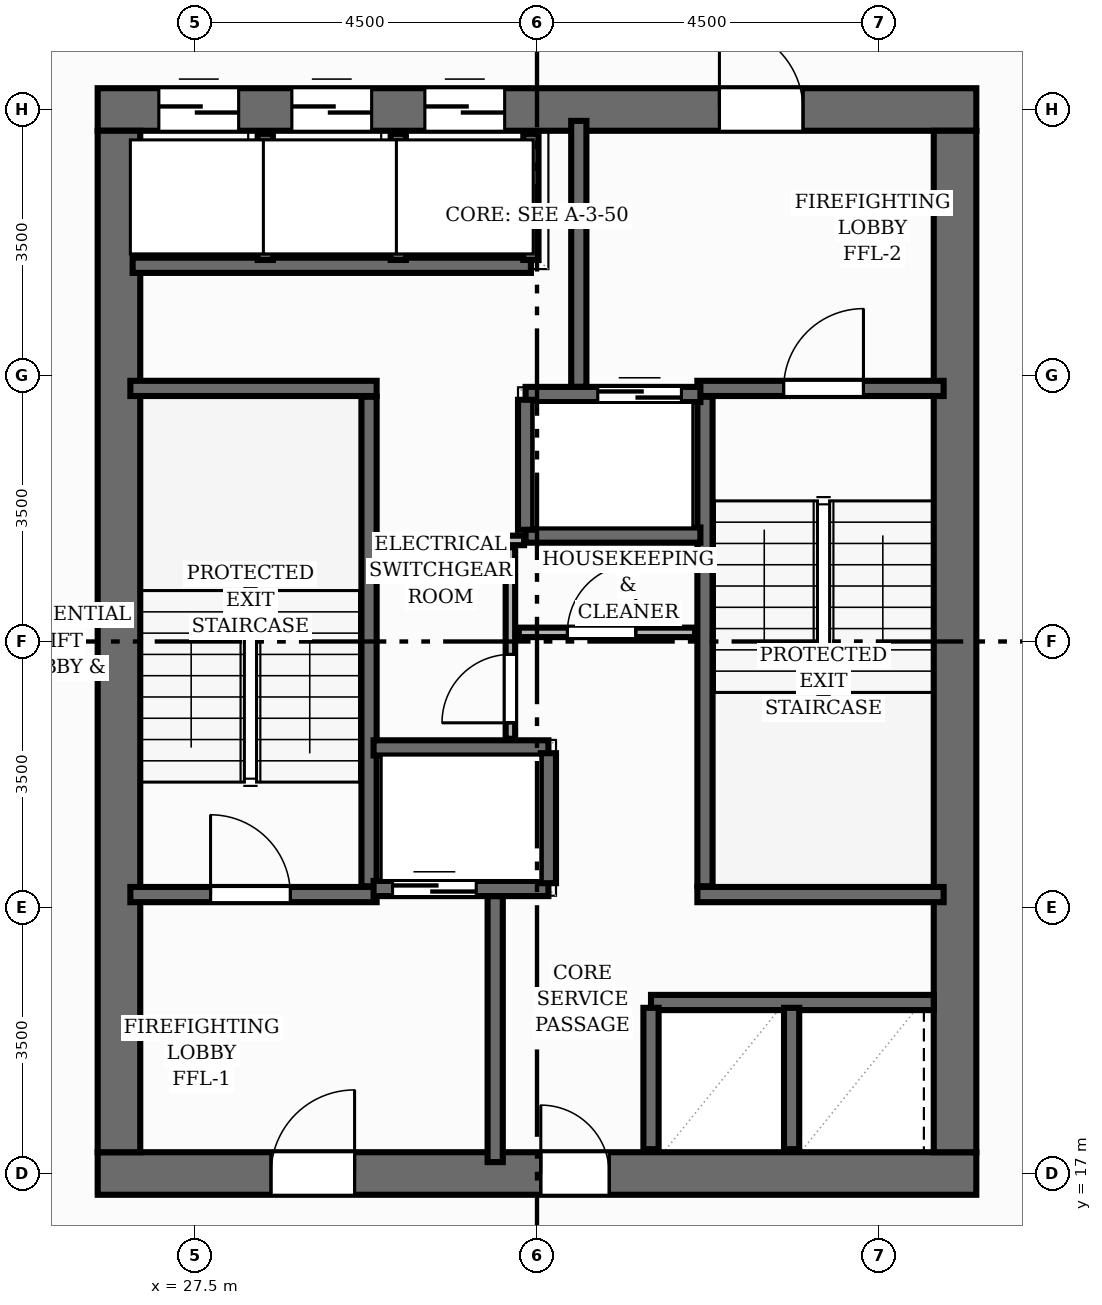
"""IFC4 building model, lengths in metres.
Left out: names, types, materials, properties, quantities, classifications, styles, units other than length and angle.
Written with IfcOpenShell. Run it as: python <this file> out.ifc"""

import sys

from ifc_helpers import new_model, si_unit, direction, frame, frame_2d, origin, place, context, subcontext, project, spatial, rectangle, extrude, element, fill, save


model = new_model("IFC4")
c1 = context("Model", 3, precision=1e-05, world=origin(), true_north=direction((0.0, 1.0)))
c2 = subcontext(c1, "Body", "Model", "MODEL_VIEW")
j1 = project(units=[si_unit("LENGTHUNIT", "METRE"), si_unit("PLANEANGLEUNIT", "RADIAN")], contexts=[c1])
p1 = place(None, origin())
s1 = spatial("IfcSite", under=j1, at=p1, CompositionType="ELEMENT")
p2 = place(p1, origin())
s2 = spatial("IfcBuilding", under=s1, at=p2, CompositionType="ELEMENT")
p3 = place(p2, frame((0.0, 0.0, 207.84)))
s3 = spatial("IfcBuildingStorey", under=s2, at=p3, CompositionType="ELEMENT", Elevation=207.84)
p4 = place(p3, frame((26.22, 17.0, 0.0), z_axis=(0.0, 0.0, 1.0), x_axis=(1.0, 0.0, 0.0)))
e1 = element("IfcWall", 1, at=p4, inside=s3, PredefinedType="SHEAR", context=c2, shape_type="SweptSolid", body=[
    extrude(rectangle(XDim=11.56, YDim=0.56, at=frame_2d((5.78, 0.0))), origin(), (0.0, 0.0, 1.0), 3.2),
])
p5 = place(p4, frame((2.28, 0.0, 0.0)))
e2 = element("IfcOpeningElement", 2, at=p5, cuts=e1, PredefinedType="OPENING", context=c2, shape_type="SweptSolid", body=[
    extrude(rectangle(XDim=1.1, YDim=2.15, at=frame_2d((0.55, 1.075))), frame((0.0, 0.29, 0.0), z_axis=(0.0, -1.0, 0.0), x_axis=(1.0, 0.0, 0.0)), (0.0, 0.0, 1.0), 0.58),
])
p6 = place(p4, frame((5.83, 0.0, 0.0)))
e3 = element("IfcOpeningElement", 3, at=p6, cuts=e1, PredefinedType="OPENING", context=c2, shape_type="SweptSolid", body=[
    extrude(rectangle(XDim=0.9, YDim=2.1, at=frame_2d((0.45, 1.05))), frame((0.0, 0.29, 0.0), z_axis=(0.0, -1.0, 0.0), x_axis=(1.0, 0.0, 0.0)), (0.0, 0.0, 1.0), 0.58),
])
p7 = place(p3, frame((26.22, 31.0, 0.0), z_axis=(0.0, 0.0, 1.0), x_axis=(1.0, 0.0, 0.0)))
e4 = element("IfcWall", 4, at=p7, inside=s3, PredefinedType="SHEAR", context=c2, shape_type="SweptSolid", body=[
    extrude(rectangle(XDim=11.56, YDim=0.56, at=frame_2d((5.78, 0.0))), origin(), (0.0, 0.0, 1.0), 3.2),
])
p8 = place(p7, frame((8.18, 0.0, 0.0)))
e5 = element("IfcOpeningElement", 5, at=p8, cuts=e4, PredefinedType="OPENING", context=c2, shape_type="SweptSolid", body=[
    extrude(rectangle(XDim=1.1, YDim=2.15, at=frame_2d((0.55, 1.075))), frame((0.0, 0.29, 0.0), z_axis=(0.0, -1.0, 0.0), x_axis=(1.0, 0.0, 0.0)), (0.0, 0.0, 1.0), 0.58),
])
p9 = place(p7, frame((0.805, 0.0, 0.0)))
e6 = element("IfcOpeningElement", 6, at=p9, cuts=e4, PredefinedType="OPENING", context=c2, shape_type="SweptSolid", body=[
    extrude(rectangle(XDim=1.05, YDim=2.15, at=frame_2d((0.525, 1.075))), frame((0.0, 0.29, 0.0), z_axis=(0.0, -1.0, 0.0), x_axis=(1.0, 0.0, 0.0)), (0.0, 0.0, 1.0), 0.58),
])
p10 = place(p7, frame((2.555, 0.0, 0.0)))
e7 = element("IfcOpeningElement", 7, at=p10, cuts=e4, PredefinedType="OPENING", context=c2, shape_type="SweptSolid", body=[
    extrude(rectangle(XDim=1.05, YDim=2.15, at=frame_2d((0.525, 1.075))), frame((0.0, 0.29, 0.0), z_axis=(0.0, -1.0, 0.0), x_axis=(1.0, 0.0, 0.0)), (0.0, 0.0, 1.0), 0.58),
])
p11 = place(p7, frame((4.305, 0.0, 0.0)))
e8 = element("IfcOpeningElement", 8, at=p11, cuts=e4, PredefinedType="OPENING", context=c2, shape_type="SweptSolid", body=[
    extrude(rectangle(XDim=1.05, YDim=2.15, at=frame_2d((0.525, 1.075))), frame((0.0, 0.29, 0.0), z_axis=(0.0, -1.0, 0.0), x_axis=(1.0, 0.0, 0.0)), (0.0, 0.0, 1.0), 0.58),
])
for number, where, z_axis, x_axis in (
    (9, (26.5, 17.28, 0.0), (0.0, 0.0, 1.0), (0.0, 1.0, 0.0)),
    (10, (37.5, 17.28, 0.0), (0.0, 0.0, 1.0), (0.0, 1.0, 0.0)),
):
    element("IfcWall", number, at=place(p3, frame(where, z_axis=z_axis, x_axis=x_axis)), inside=s3, PredefinedType="SHEAR", context=c2, shape_type="SweptSolid", body=[
        extrude(rectangle(XDim=13.44, YDim=0.56, at=frame_2d((6.72, 0.0))), origin(), (0.0, 0.0, 1.0), 3.2),
    ])
p12 = place(p3, frame((29.79, 20.78, 0.0), z_axis=(0.0, 0.0, 1.0), x_axis=(0.0, 1.0, 0.0)))
e11 = element("IfcWall", 11, at=p12, inside=s3, PredefinedType="SHEAR", context=c2, shape_type="SweptSolid", body=[
    extrude(rectangle(XDim=6.44, YDim=0.2, at=frame_2d((3.22, 0.0))), origin(), (0.0, 0.0, 1.0), 3.2),
])
p13 = place(p3, frame((26.65, 27.33, 0.0), z_axis=(0.0, 0.0, 1.0), x_axis=(1.0, 0.0, 0.0)))
e12 = element("IfcWall", 12, at=p13, inside=s3, PredefinedType="SHEAR", context=c2, shape_type="SweptSolid", body=[
    extrude(rectangle(XDim=3.24, YDim=0.2, at=frame_2d((1.62, 0.0))), origin(), (0.0, 0.0, 1.0), 3.2),
])
p14 = place(p3, frame((26.65, 20.67, 0.0), z_axis=(0.0, 0.0, 1.0), x_axis=(1.0, 0.0, 0.0)))
e13 = element("IfcWall", 13, at=p14, inside=s3, PredefinedType="SHEAR", context=c2, shape_type="SweptSolid", body=[
    extrude(rectangle(XDim=3.24, YDim=0.2, at=frame_2d((1.62, 0.0))), origin(), (0.0, 0.0, 1.0), 3.2),
])
p15 = place(p14, frame((1.055, 0.0, 0.0)))
e14 = element("IfcOpeningElement", 14, at=p15, cuts=e13, PredefinedType="OPENING", context=c2, shape_type="SweptSolid", body=[
    extrude(rectangle(XDim=1.05, YDim=2.15, at=frame_2d((0.525, 1.075))), frame((0.0, 0.11, 0.0), z_axis=(0.0, -1.0, 0.0), x_axis=(1.0, 0.0, 0.0)), (0.0, 0.0, 1.0), 0.22),
])
p16 = place(p3, frame((34.21, 20.78, 0.0), z_axis=(0.0, 0.0, 1.0), x_axis=(0.0, 1.0, 0.0)))
e15 = element("IfcWall", 15, at=p16, inside=s3, PredefinedType="SHEAR", context=c2, shape_type="SweptSolid", body=[
    extrude(rectangle(XDim=6.44, YDim=0.2, at=frame_2d((3.22, 0.0))), origin(), (0.0, 0.0, 1.0), 3.2),
])
p17 = place(p3, frame((34.11, 20.67, 0.0), z_axis=(0.0, 0.0, 1.0), x_axis=(1.0, 0.0, 0.0)))
e16 = element("IfcWall", 16, at=p17, inside=s3, PredefinedType="SHEAR", context=c2, shape_type="SweptSolid", body=[
    extrude(rectangle(XDim=3.24, YDim=0.2, at=frame_2d((1.62, 0.0))), origin(), (0.0, 0.0, 1.0), 3.2),
])
p18 = place(p3, frame((34.11, 27.33, 0.0), z_axis=(0.0, 0.0, 1.0), x_axis=(1.0, 0.0, 0.0)))
e17 = element("IfcWall", 17, at=p18, inside=s3, PredefinedType="SHEAR", context=c2, shape_type="SweptSolid", body=[
    extrude(rectangle(XDim=3.24, YDim=0.2, at=frame_2d((1.62, 0.0))), origin(), (0.0, 0.0, 1.0), 3.2),
])
p19 = place(p18, frame((1.135, 0.0, 0.0)))
e18 = element("IfcOpeningElement", 18, at=p19, cuts=e17, PredefinedType="OPENING", context=c2, shape_type="SweptSolid", body=[
    extrude(rectangle(XDim=1.05, YDim=2.15, at=frame_2d((0.525, 1.075))), frame((0.0, 0.11, 0.0), z_axis=(0.0, -1.0, 0.0), x_axis=(1.0, 0.0, 0.0)), (0.0, 0.0, 1.0), 0.22),
])
for number, where, z_axis, x_axis in (
    (19, (31.45, 17.15, 0.0), (0.0, 0.0, 1.0), (0.0, 1.0, 0.0)),
    (20, (32.55, 27.35, 0.0), (0.0, 0.0, 1.0), (0.0, 1.0, 0.0)),
):
    element("IfcWall", number, at=place(p3, frame(where, z_axis=z_axis, x_axis=x_axis)), inside=s3, PredefinedType="SHEAR", context=c2, shape_type="SweptSolid", body=[
        extrude(rectangle(XDim=3.5, YDim=0.2, at=frame_2d((1.75, 0.0))), origin(), (0.0, 0.0, 1.0), 3.2),
    ])
p20 = place(p3, frame((29.85, 20.75, 0.0), z_axis=(0.0, 0.0, 1.0), x_axis=(1.0, 0.0, 0.0)))
e21 = element("IfcWall", 21, at=p20, inside=s3, PredefinedType="SHEAR", context=c2, shape_type="SweptSolid", body=[
    extrude(rectangle(XDim=2.3, YDim=0.2, at=frame_2d((1.15, 0.0))), origin(), (0.0, 0.0, 1.0), 3.2),
])
p21 = place(p20, frame((0.25, 0.0, 0.0)))
e22 = element("IfcOpeningElement", 22, at=p21, cuts=e21, PredefinedType="OPENING", context=c2, shape_type="SweptSolid", body=[
    extrude(rectangle(XDim=1.1, YDim=2.15, at=frame_2d((0.55, 1.075))), frame((0.0, 0.11, 0.0), z_axis=(0.0, -1.0, 0.0), x_axis=(1.0, 0.0, 0.0)), (0.0, 0.0, 1.0), 0.22),
])
p22 = place(p3, frame((29.85, 22.6, 0.0), z_axis=(0.0, 0.0, 1.0), x_axis=(1.0, 0.0, 0.0)))
e23 = element("IfcWall", 23, at=p22, inside=s3, PredefinedType="SHEAR", context=c2, shape_type="SweptSolid", body=[
    extrude(rectangle(XDim=2.3, YDim=0.2, at=frame_2d((1.15, 0.0))), origin(), (0.0, 0.0, 1.0), 3.2),
])
p23 = place(p3, frame((32.15, 20.82, 0.0), z_axis=(0.0, 0.0, 1.0), x_axis=(0.0, 1.0, 0.0)))
e24 = element("IfcWall", 24, at=p23, inside=s3, PredefinedType="SHEAR", context=c2, shape_type="SweptSolid", body=[
    extrude(rectangle(XDim=1.71, YDim=0.2, at=frame_2d((0.855, 0.0))), origin(), (0.0, 0.0, 1.0), 3.2),
])
p24 = place(p3, frame((31.85, 27.25, 0.0), z_axis=(0.0, 0.0, 1.0), x_axis=(1.0, 0.0, 0.0)))
e25 = element("IfcWall", 25, at=p24, inside=s3, PredefinedType="SHEAR", context=c2, shape_type="SweptSolid", body=[
    extrude(rectangle(XDim=2.3, YDim=0.2, at=frame_2d((1.15, 0.0))), origin(), (0.0, 0.0, 1.0), 3.2),
])
p25 = place(p24, frame((0.95, 0.0, 0.0)))
e26 = element("IfcOpeningElement", 26, at=p25, cuts=e25, PredefinedType="OPENING", context=c2, shape_type="SweptSolid", body=[
    extrude(rectangle(XDim=1.1, YDim=2.15, at=frame_2d((0.55, 1.075))), frame((0.0, 0.11, 0.0), z_axis=(0.0, -1.0, 0.0), x_axis=(1.0, 0.0, 0.0)), (0.0, 0.0, 1.0), 0.22),
])
p26 = place(p3, frame((31.85, 25.4, 0.0), z_axis=(0.0, 0.0, 1.0), x_axis=(1.0, 0.0, 0.0)))
e27 = element("IfcWall", 27, at=p26, inside=s3, PredefinedType="SHEAR", context=c2, shape_type="SweptSolid", body=[
    extrude(rectangle(XDim=2.3, YDim=0.2, at=frame_2d((1.15, 0.0))), origin(), (0.0, 0.0, 1.0), 3.2),
])
p27 = place(p3, frame((31.85, 25.47, 0.0), z_axis=(0.0, 0.0, 1.0), x_axis=(0.0, 1.0, 0.0)))
e28 = element("IfcWall", 28, at=p27, inside=s3, PredefinedType="SHEAR", context=c2, shape_type="SweptSolid", body=[
    extrude(rectangle(XDim=1.71, YDim=0.2, at=frame_2d((0.855, 0.0))), origin(), (0.0, 0.0, 1.0), 3.2),
])
p28 = place(p3, frame((26.68, 28.95, 0.0), z_axis=(0.0, 0.0, 1.0), x_axis=(1.0, 0.0, 0.0)))
e29 = element("IfcWall", 29, at=p28, inside=s3, PredefinedType="SHEAR", context=c2, shape_type="SweptSolid", body=[
    extrude(rectangle(XDim=5.24, YDim=0.2, at=frame_2d((2.62, 0.0))), origin(), (0.0, 0.0, 1.0), 3.2),
])
for number, where, z_axis, x_axis in (
    (30, (31.92, 29.02, 0.0), (0.0, 0.0, 1.0), (0.0, 1.0, 0.0)),
    (31, (28.425, 29.02, 0.0), (0.0, 0.0, 1.0), (0.0, 1.0, 0.0)),
    (32, (30.175, 29.02, 0.0), (0.0, 0.0, 1.0), (0.0, 1.0, 0.0)),
):
    element("IfcWall", number, at=place(p3, frame(where, z_axis=z_axis, x_axis=x_axis)), inside=s3, PredefinedType="SHEAR", context=c2, shape_type="SweptSolid", body=[
        extrude(rectangle(XDim=1.66, YDim=0.2, at=frame_2d((0.83, 0.0))), origin(), (0.0, 0.0, 1.0), 3.2),
    ])
p29 = place(p3, frame((33.5, 19.25, 0.0), z_axis=(0.0, 0.0, 1.0), x_axis=(1.0, 0.0, 0.0)))
e33 = element("IfcWall", 33, at=p29, inside=s3, PredefinedType="SHEAR", context=c2, shape_type="SweptSolid", body=[
    extrude(rectangle(XDim=3.72, YDim=0.2, at=frame_2d((1.86, 0.0))), origin(), (0.0, 0.0, 1.0), 3.2),
])
for number, where, z_axis, x_axis in (
    (34, (33.5, 17.32, 0.0), (0.0, 0.0, 1.0), (0.0, 1.0, 0.0)),
    (35, (35.35, 17.32, 0.0), (0.0, 0.0, 1.0), (0.0, 1.0, 0.0)),
):
    element("IfcWall", number, at=place(p3, frame(where, z_axis=z_axis, x_axis=x_axis)), inside=s3, PredefinedType="SHEAR", context=c2, shape_type="SweptSolid", body=[
        extrude(rectangle(XDim=1.86, YDim=0.2, at=frame_2d((0.93, 0.0))), origin(), (0.0, 0.0, 1.0), 3.2),
    ])
p30 = place(p3, frame((31.65, 22.72, 0.0), z_axis=(0.0, 0.0, 1.0), x_axis=(0.0, 1.0, 0.0)))
e36 = element("IfcWall", 36, at=p30, inside=s3, PredefinedType="PARTITIONING", context=c2, shape_type="SweptSolid", body=[
    extrude(rectangle(XDim=2.52, YDim=0.125, at=frame_2d((1.26, 0.0))), origin(), (0.0, 0.0, 1.0), 2.955),
])
p31 = place(p30, frame((0.21, 0.0, 0.0)))
e37 = element("IfcOpeningElement", 37, at=p31, cuts=e36, PredefinedType="OPENING", context=c2, shape_type="SweptSolid", body=[
    extrude(rectangle(XDim=0.9, YDim=2.1, at=frame_2d((0.45, 1.05))), frame((0.0, 0.073, 0.0), z_axis=(0.0, -1.0, 0.0), x_axis=(1.0, 0.0, 0.0)), (0.0, 0.0, 1.0), 0.145),
])
p32 = place(p3, frame((31.76, 24.12, 0.0), z_axis=(0.0, 0.0, 1.0), x_axis=(1.0, 0.0, 0.0)))
e38 = element("IfcWall", 38, at=p32, inside=s3, PredefinedType="PARTITIONING", context=c2, shape_type="SweptSolid", body=[
    extrude(rectangle(XDim=2.32, YDim=0.125, at=frame_2d((1.16, 0.0))), origin(), (0.0, 0.0, 1.0), 2.955),
])
p33 = place(p32, frame((0.64, 0.0, 0.0)))
e39 = element("IfcOpeningElement", 39, at=p33, cuts=e38, PredefinedType="OPENING", context=c2, shape_type="SweptSolid", body=[
    extrude(rectangle(XDim=0.9, YDim=2.1, at=frame_2d((0.45, 1.05))), frame((0.0, 0.073, 0.0), z_axis=(0.0, -1.0, 0.0), x_axis=(1.0, 0.0, 0.0)), (0.0, 0.0, 1.0), 0.145),
])
p34 = place(p3, frame((29.89, 25.33, 0.0), z_axis=(0.0, 0.0, 1.0), x_axis=(1.0, 0.0, 0.0)))
e40 = element("IfcWall", 40, at=p34, inside=s3, PredefinedType="PARTITIONING", context=c2, shape_type="SweptSolid", body=[
    extrude(rectangle(XDim=1.94, YDim=0.125, at=frame_2d((0.97, 0.0))), origin(), (0.0, 0.0, 1.0), 2.955),
])
p35 = place(p15, origin())
e41 = element("IfcDoor", 41, at=p35, inside=s3, OperationType="SINGLE_SWING_LEFT", PredefinedType="DOOR", context=c2, shape_type="SweptSolid", body=[
    extrude(rectangle(XDim=1.05, YDim=2.15, at=frame_2d((0.525, 1.075))), frame((0.0, 0.025, 0.0), z_axis=(0.0, -1.0, 0.0), x_axis=(1.0, 0.0, 0.0)), (0.0, 0.0, 1.0), 0.05),
])
fill(e14, e41)
p36 = place(p19, origin())
e42 = element("IfcDoor", 42, at=p36, inside=s3, OperationType="SINGLE_SWING_RIGHT", PredefinedType="DOOR", context=c2, shape_type="SweptSolid", body=[
    extrude(rectangle(XDim=1.05, YDim=2.15, at=frame_2d((0.525, 1.075))), frame((0.0, 0.025, 0.0), z_axis=(0.0, -1.0, 0.0), x_axis=(1.0, 0.0, 0.0)), (0.0, 0.0, 1.0), 0.05),
])
fill(e18, e42)
p37 = place(p5, origin())
e43 = element("IfcDoor", 43, at=p37, inside=s3, OperationType="SINGLE_SWING_RIGHT", PredefinedType="DOOR", context=c2, shape_type="SweptSolid", body=[
    extrude(rectangle(XDim=1.1, YDim=2.15, at=frame_2d((0.55, 1.075))), frame((0.0, 0.025, 0.0), z_axis=(0.0, -1.0, 0.0), x_axis=(1.0, 0.0, 0.0)), (0.0, 0.0, 1.0), 0.05),
])
fill(e2, e43)
p38 = place(p8, origin())
e44 = element("IfcDoor", 44, at=p38, inside=s3, OperationType="SINGLE_SWING_LEFT", PredefinedType="DOOR", context=c2, shape_type="SweptSolid", body=[
    extrude(rectangle(XDim=1.1, YDim=2.15, at=frame_2d((0.55, 1.075))), frame((0.0, 0.025, 0.0), z_axis=(0.0, -1.0, 0.0), x_axis=(1.0, 0.0, 0.0)), (0.0, 0.0, 1.0), 0.05),
])
fill(e5, e44)
p39 = place(p21, origin())
e45 = element("IfcDoor", 45, at=p39, inside=s3, OperationType="DOUBLE_DOOR_SLIDING", PredefinedType="DOOR", context=c2, shape_type="SweptSolid", body=[
    extrude(rectangle(XDim=1.1, YDim=2.15, at=frame_2d((0.55, 1.075))), frame((0.0, 0.025, 0.0), z_axis=(0.0, -1.0, 0.0), x_axis=(1.0, 0.0, 0.0)), (0.0, 0.0, 1.0), 0.05),
])
fill(e22, e45)
p40 = place(p25, origin())
e46 = element("IfcDoor", 46, at=p40, inside=s3, OperationType="DOUBLE_DOOR_SLIDING", PredefinedType="DOOR", context=c2, shape_type="SweptSolid", body=[
    extrude(rectangle(XDim=1.1, YDim=2.15, at=frame_2d((0.55, 1.075))), frame((0.0, 0.025, 0.0), z_axis=(0.0, -1.0, 0.0), x_axis=(1.0, 0.0, 0.0)), (0.0, 0.0, 1.0), 0.05),
])
fill(e26, e46)
p41 = place(p9, origin())
e47 = element("IfcDoor", 47, at=p41, inside=s3, OperationType="DOUBLE_DOOR_SLIDING", PredefinedType="DOOR", context=c2, shape_type="SweptSolid", body=[
    extrude(rectangle(XDim=1.05, YDim=2.15, at=frame_2d((0.525, 1.075))), frame((0.0, 0.025, 0.0), z_axis=(0.0, -1.0, 0.0), x_axis=(1.0, 0.0, 0.0)), (0.0, 0.0, 1.0), 0.05),
])
fill(e6, e47)
p42 = place(p10, origin())
e48 = element("IfcDoor", 48, at=p42, inside=s3, OperationType="DOUBLE_DOOR_SLIDING", PredefinedType="DOOR", context=c2, shape_type="SweptSolid", body=[
    extrude(rectangle(XDim=1.05, YDim=2.15, at=frame_2d((0.525, 1.075))), frame((0.0, 0.025, 0.0), z_axis=(0.0, -1.0, 0.0), x_axis=(1.0, 0.0, 0.0)), (0.0, 0.0, 1.0), 0.05),
])
fill(e7, e48)
p43 = place(p11, origin())
e49 = element("IfcDoor", 49, at=p43, inside=s3, OperationType="DOUBLE_DOOR_SLIDING", PredefinedType="DOOR", context=c2, shape_type="SweptSolid", body=[
    extrude(rectangle(XDim=1.05, YDim=2.15, at=frame_2d((0.525, 1.075))), frame((0.0, 0.025, 0.0), z_axis=(0.0, -1.0, 0.0), x_axis=(1.0, 0.0, 0.0)), (0.0, 0.0, 1.0), 0.05),
])
fill(e8, e49)
p44 = place(p6, origin())
e50 = element("IfcDoor", 50, at=p44, inside=s3, OperationType="SINGLE_SWING_LEFT", PredefinedType="DOOR", context=c2, shape_type="SweptSolid", body=[
    extrude(rectangle(XDim=0.9, YDim=2.1, at=frame_2d((0.45, 1.05))), frame((0.0, 0.025, 0.0), z_axis=(0.0, -1.0, 0.0), x_axis=(1.0, 0.0, 0.0)), (0.0, 0.0, 1.0), 0.05),
])
fill(e3, e50)
p45 = place(p31, origin())
e51 = element("IfcDoor", 51, at=p45, inside=s3, OperationType="SINGLE_SWING_LEFT", PredefinedType="DOOR", context=c2, shape_type="SweptSolid", body=[
    extrude(rectangle(XDim=0.9, YDim=2.1, at=frame_2d((0.45, 1.05))), frame((0.0, 0.025, 0.0), z_axis=(0.0, -1.0, 0.0), x_axis=(1.0, 0.0, 0.0)), (0.0, 0.0, 1.0), 0.05),
])
fill(e37, e51)
p46 = place(p33, origin())
e52 = element("IfcDoor", 52, at=p46, inside=s3, OperationType="SINGLE_SWING_RIGHT", PredefinedType="DOOR", context=c2, shape_type="SweptSolid", body=[
    extrude(rectangle(XDim=0.9, YDim=2.1, at=frame_2d((0.45, 1.05))), frame((0.0, 0.025, 0.0), z_axis=(0.0, -1.0, 0.0), x_axis=(1.0, 0.0, 0.0)), (0.0, 0.0, 1.0), 0.05),
])
fill(e39, e52)
save(model, sys.argv[1])
